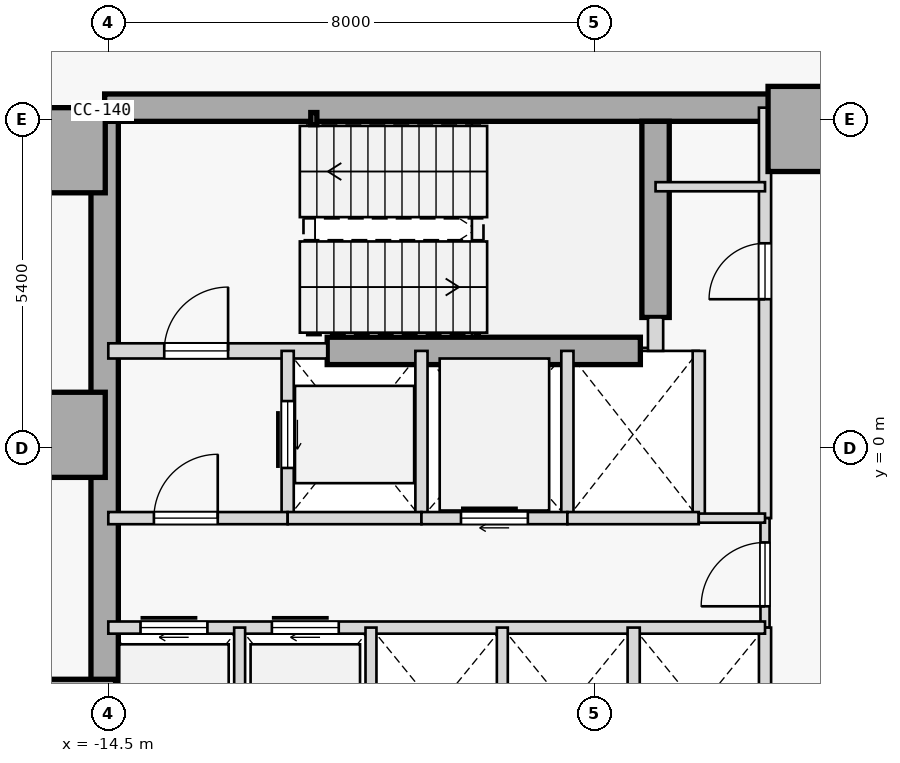
"""IFC4 building model, lengths in metres.
Left out: names, types, materials, properties, quantities, classifications, styles, units other than length and angle.
Written with IfcOpenShell. Run it as: python <this file> out.ifc"""

import sys

from ifc_helpers import new_model, si_unit, direction, frame, frame_2d, origin, origin_2d, place, context, subcontext, project, spatial, rectangle, hollow_rectangle, extrude, element, fill, save


model = new_model("IFC4")
c1 = context("Model", 3, precision=1e-05, world=origin(), true_north=direction((0.0, 1.0)))
c2 = subcontext(c1, "Body", "Model", "MODEL_VIEW")
j1 = project(units=[si_unit("LENGTHUNIT", "METRE"), si_unit("PLANEANGLEUNIT", "RADIAN")], contexts=[c1])
p1 = place(None, origin())
s1 = spatial("IfcSite", under=j1, at=p1, CompositionType="ELEMENT")
p2 = place(p1, origin())
s2 = spatial("IfcBuilding", under=s1, at=p2, CompositionType="ELEMENT")
p3 = place(p2, frame((0.0, 0.0, 56.0)))
s3 = spatial("IfcBuildingStorey", under=s2, at=p3, CompositionType="ELEMENT", Elevation=56.0)
for number, where, z_axis, x_axis in (
    (1, (-15.25, 4.9, 0.0), (0.0, 0.0, 1.0), (1.0, 0.0, 0.0)),
    (2, (-15.25, 0.22, 0.0), (0.0, 0.0, 1.0), (1.0, 0.0, 0.0)),
    (3, (-15.08, -4.5, 0.0), (0.0, 0.0, 1.0), (1.0, 0.0, 0.0)),
    (4, (-2.95, 5.25, 0.0), (0.0, 0.0, 1.0), (1.0, 0.0, 0.0)),
):
    element("IfcColumn", number, at=place(p3, frame(where, z_axis=z_axis, x_axis=x_axis)), inside=s3, PredefinedType="COLUMN", context=c2, shape_type="SweptSolid", body=[
        extrude(rectangle(XDim=1.4, YDim=1.4, at=origin_2d()), origin(), (0.0, 0.0, 1.0), 3.8),
    ])
p4 = place(p3, frame((-14.56, 5.6, 0.0), z_axis=(0.0, 0.0, 1.0), x_axis=(1.0, 0.0, 0.0)))
e5 = element("IfcWall", 5, at=p4, inside=s3, PredefinedType="SHEAR", context=c2, shape_type="SweptSolid", body=[
    extrude(rectangle(XDim=11.41, YDim=0.45, at=frame_2d((5.705, 0.0))), origin(), (0.0, 0.0, 1.0), 3.575),
])
p5 = place(p3, frame((-14.56, -5.375, 0.0), z_axis=(0.0, 0.0, 1.0), x_axis=(0.0, 1.0, 0.0)))
e6 = element("IfcWall", 6, at=p5, inside=s3, PredefinedType="SHEAR", context=c2, shape_type="SweptSolid", body=[
    extrude(rectangle(XDim=10.75, YDim=0.45, at=frame_2d((5.375, 0.0))), origin(), (0.0, 0.0, 1.0), 3.575),
])
p6 = place(p3, frame((-5.5, 2.15, 0.0), z_axis=(0.0, 0.0, 1.0), x_axis=(0.0, 1.0, 0.0)))
e7 = element("IfcWall", 7, at=p6, inside=s3, PredefinedType="SHEAR", context=c2, shape_type="SweptSolid", body=[
    extrude(rectangle(XDim=3.225, YDim=0.45, at=frame_2d((1.613, 0.0))), origin(), (0.0, 0.0, 1.0), 3.575),
])
p7 = place(p3, frame((-10.9, 1.6, 0.0), z_axis=(0.0, 0.0, 1.0), x_axis=(1.0, 0.0, 0.0)))
e8 = element("IfcWall", 8, at=p7, inside=s3, PredefinedType="SHEAR", context=c2, shape_type="SweptSolid", body=[
    extrude(rectangle(XDim=5.15, YDim=0.45, at=frame_2d((2.575, 0.0))), origin(), (0.0, 0.0, 1.0), 3.575),
])
p8 = place(p3, frame((-11.12, 5.42, 0.0), z_axis=(0.0, 0.0, 1.0), x_axis=(1.0, 0.0, 0.0)))
e9 = element("IfcColumn", 9, at=p8, inside=s3, PredefinedType="COLUMN", context=c2, shape_type="SweptSolid", body=[
    extrude(hollow_rectangle(XDim=0.1, YDim=0.2, WallThickness=0.008, at=origin_2d()), origin(), (0.0, 0.0, 1.0), 3.8),
])
p9 = place(p3, frame((-14.5, 1.6, 0.0), z_axis=(0.0, 0.0, 1.0), x_axis=(1.0, 0.0, 0.0)))
e10 = element("IfcWall", 10, at=p9, inside=s3, PredefinedType="STANDARD", context=c2, shape_type="SweptSolid", body=[
    extrude(rectangle(XDim=3.6, YDim=0.25, at=frame_2d((1.8, 0.0))), origin(), (0.0, 0.0, 1.0), 3.575),
])
p10 = place(p9, frame((0.92, 0.0, 0.0)))
e11 = element("IfcOpeningElement", 11, at=p10, cuts=e10, PredefinedType="OPENING", context=c2, shape_type="SweptSolid", body=[
    extrude(rectangle(XDim=1.05, YDim=2.15, at=frame_2d((0.525, 1.075))), frame((0.0, 0.135, 0.0), z_axis=(0.0, -1.0, 0.0), x_axis=(1.0, 0.0, 0.0)), (0.0, 0.0, 1.0), 0.27),
])
p11 = place(p3, frame((-5.5, 1.6, 0.0), z_axis=(0.0, 0.0, 1.0), x_axis=(0.0, 1.0, 0.0)))
e12 = element("IfcWall", 12, at=p11, inside=s3, PredefinedType="STANDARD", context=c2, shape_type="SweptSolid", body=[
    extrude(rectangle(XDim=0.55, YDim=0.25, at=frame_2d((0.275, 0.0))), origin(), (0.0, 0.0, 1.0), 3.575),
])
p12 = place(p3, frame((-3.7, -1.15, 0.0), z_axis=(0.0, 0.0, 1.0), x_axis=(0.0, 1.0, 0.0)))
e13 = element("IfcWall", 13, at=p12, inside=s3, PredefinedType="STANDARD", context=c2, shape_type="SweptSolid", body=[
    extrude(rectangle(XDim=6.75, YDim=0.2, at=frame_2d((3.375, 0.0))), origin(), (0.0, 0.0, 1.0), 3.575),
])
p13 = place(p12, frame((3.6, 0.0, 0.0)))
e14 = element("IfcOpeningElement", 14, at=p13, cuts=e13, PredefinedType="OPENING", context=c2, shape_type="SweptSolid", body=[
    extrude(rectangle(XDim=0.92, YDim=2.15, at=frame_2d((0.46, 1.075))), frame((0.0, 0.11, 0.0), z_axis=(0.0, -1.0, 0.0), x_axis=(1.0, 0.0, 0.0)), (0.0, 0.0, 1.0), 0.22),
])
p14 = place(p3, frame((-3.7, -2.95, 0.0), z_axis=(0.0, 0.0, 1.0), x_axis=(0.0, 1.0, 0.0)))
e15 = element("IfcWall", 15, at=p14, inside=s3, PredefinedType="PARTITIONING", context=c2, shape_type="SweptSolid", body=[
    extrude(rectangle(XDim=1.8, YDim=0.15, at=frame_2d((0.9, 0.0))), origin(), (0.0, 0.0, 1.0), 3.575),
])
p15 = place(p14, frame((0.35, 0.0, 0.0)))
e16 = element("IfcOpeningElement", 16, at=p15, cuts=e15, PredefinedType="OPENING", context=c2, shape_type="SweptSolid", body=[
    extrude(rectangle(XDim=1.05, YDim=2.18, at=frame_2d((0.525, 1.09))), frame((0.0, 0.085, 0.0), z_axis=(0.0, -1.0, 0.0), x_axis=(1.0, 0.0, 0.0)), (0.0, 0.0, 1.0), 0.17),
])
p16 = place(p3, frame((-3.7, -5.6, 0.0), z_axis=(0.0, 0.0, 1.0), x_axis=(0.0, 1.0, 0.0)))
e17 = element("IfcWall", 17, at=p16, inside=s3, PredefinedType="STANDARD", context=c2, shape_type="SweptSolid", body=[
    extrude(rectangle(XDim=2.65, YDim=0.2, at=frame_2d((1.325, 0.0))), origin(), (0.0, 0.0, 1.0), 3.575),
])
p17 = place(p3, frame((-11.55, -1.15, 0.0), z_axis=(0.0, 0.0, 1.0), x_axis=(0.0, 1.0, 0.0)))
e18 = element("IfcWall", 18, at=p17, inside=s3, PredefinedType="STANDARD", context=c2, shape_type="SweptSolid", body=[
    extrude(rectangle(XDim=2.75, YDim=0.2, at=frame_2d((1.375, 0.0))), origin(), (0.0, 0.0, 1.0), 3.575),
])
p18 = place(p17, frame((0.825, 0.0, 0.0)))
e19 = element("IfcOpeningElement", 19, at=p18, cuts=e18, PredefinedType="OPENING", context=c2, shape_type="SweptSolid", body=[
    extrude(rectangle(XDim=1.1, YDim=2.15, at=frame_2d((0.55, 1.075))), frame((0.0, 0.11, 0.0), z_axis=(0.0, -1.0, 0.0), x_axis=(1.0, 0.0, 0.0)), (0.0, 0.0, 1.0), 0.22),
])
p19 = place(p3, frame((-9.35, -1.15, 0.0), z_axis=(0.0, 0.0, 1.0), x_axis=(0.0, 1.0, 0.0)))
e20 = element("IfcWall", 20, at=p19, inside=s3, PredefinedType="STANDARD", context=c2, shape_type="SweptSolid", body=[
    extrude(rectangle(XDim=2.75, YDim=0.2, at=frame_2d((1.375, 0.0))), origin(), (0.0, 0.0, 1.0), 3.575),
])
p20 = place(p3, frame((-14.5, -1.15, 0.0), z_axis=(0.0, 0.0, 1.0), x_axis=(1.0, 0.0, 0.0)))
e21 = element("IfcWall", 21, at=p20, inside=s3, PredefinedType="STANDARD", context=c2, shape_type="SweptSolid", body=[
    extrude(rectangle(XDim=2.95, YDim=0.2, at=frame_2d((1.475, 0.0))), origin(), (0.0, 0.0, 1.0), 3.575),
])
p21 = place(p20, frame((0.75, 0.0, 0.0)))
e22 = element("IfcOpeningElement", 22, at=p21, cuts=e21, PredefinedType="OPENING", context=c2, shape_type="SweptSolid", body=[
    extrude(rectangle(XDim=1.05, YDim=2.18, at=frame_2d((0.525, 1.09))), frame((0.0, 0.11, 0.0), z_axis=(0.0, -1.0, 0.0), x_axis=(1.0, 0.0, 0.0)), (0.0, 0.0, 1.0), 0.22),
])
p22 = place(p3, frame((-11.55, -1.15, 0.0), z_axis=(0.0, 0.0, 1.0), x_axis=(1.0, 0.0, 0.0)))
e23 = element("IfcWall", 23, at=p22, inside=s3, PredefinedType="STANDARD", context=c2, shape_type="SweptSolid", body=[
    extrude(rectangle(XDim=2.2, YDim=0.2, at=frame_2d((1.1, 0.0))), origin(), (0.0, 0.0, 1.0), 3.575),
])
p23 = place(p3, frame((-6.95, -1.15, 0.0), z_axis=(0.0, 0.0, 1.0), x_axis=(0.0, 1.0, 0.0)))
e24 = element("IfcWall", 24, at=p23, inside=s3, PredefinedType="STANDARD", context=c2, shape_type="SweptSolid", body=[
    extrude(rectangle(XDim=2.75, YDim=0.2, at=frame_2d((1.375, 0.0))), origin(), (0.0, 0.0, 1.0), 3.575),
])
p24 = place(p3, frame((-9.35, -1.15, 0.0), z_axis=(0.0, 0.0, 1.0), x_axis=(1.0, 0.0, 0.0)))
e25 = element("IfcWall", 25, at=p24, inside=s3, PredefinedType="STANDARD", context=c2, shape_type="SweptSolid", body=[
    extrude(rectangle(XDim=2.4, YDim=0.2, at=frame_2d((1.2, 0.0))), origin(), (0.0, 0.0, 1.0), 3.575),
])
p25 = place(p24, frame((0.65, 0.0, 0.0)))
e26 = element("IfcOpeningElement", 26, at=p25, cuts=e25, PredefinedType="OPENING", context=c2, shape_type="SweptSolid", body=[
    extrude(rectangle(XDim=1.1, YDim=2.15, at=frame_2d((0.55, 1.075))), frame((0.0, 0.11, 0.0), z_axis=(0.0, -1.0, 0.0), x_axis=(1.0, 0.0, 0.0)), (0.0, 0.0, 1.0), 0.22),
])
p26 = place(p3, frame((-4.79, -1.15, 0.0), z_axis=(0.0, 0.0, 1.0), x_axis=(0.0, 1.0, 0.0)))
e27 = element("IfcWall", 27, at=p26, inside=s3, PredefinedType="STANDARD", context=c2, shape_type="SweptSolid", body=[
    extrude(rectangle(XDim=2.75, YDim=0.2, at=frame_2d((1.375, 0.0))), origin(), (0.0, 0.0, 1.0), 3.575),
])
p27 = place(p3, frame((-6.95, -1.15, 0.0), z_axis=(0.0, 0.0, 1.0), x_axis=(1.0, 0.0, 0.0)))
e28 = element("IfcWall", 28, at=p27, inside=s3, PredefinedType="STANDARD", context=c2, shape_type="SweptSolid", body=[
    extrude(rectangle(XDim=2.16, YDim=0.2, at=frame_2d((1.08, 0.0))), origin(), (0.0, 0.0, 1.0), 3.575),
])
p28 = place(p3, frame((-4.79, -1.15, 0.0), z_axis=(0.0, 0.0, 1.0), x_axis=(1.0, 0.0, 0.0)))
e29 = element("IfcWall", 29, at=p28, inside=s3, PredefinedType="PARTITIONING", context=c2, shape_type="SweptSolid", body=[
    extrude(rectangle(XDim=1.09, YDim=0.15, at=frame_2d((0.545, 0.0))), origin(), (0.0, 0.0, 1.0), 3.575),
])
p29 = place(p3, frame((-14.5, -2.95, 0.0), z_axis=(0.0, 0.0, 1.0), x_axis=(1.0, 0.0, 0.0)))
e30 = element("IfcWall", 30, at=p29, inside=s3, PredefinedType="STANDARD", context=c2, shape_type="SweptSolid", body=[
    extrude(rectangle(XDim=10.8, YDim=0.2, at=frame_2d((5.4, 0.0))), origin(), (0.0, 0.0, 1.0), 3.575),
])
p30 = place(p29, frame((0.53, 0.0, 0.0)))
e31 = element("IfcOpeningElement", 31, at=p30, cuts=e30, PredefinedType="OPENING", context=c2, shape_type="SweptSolid", body=[
    extrude(rectangle(XDim=1.1, YDim=2.15, at=frame_2d((0.55, 1.075))), frame((0.0, 0.11, 0.0), z_axis=(0.0, -1.0, 0.0), x_axis=(1.0, 0.0, 0.0)), (0.0, 0.0, 1.0), 0.22),
])
p31 = place(p29, frame((2.69, 0.0, 0.0)))
e32 = element("IfcOpeningElement", 32, at=p31, cuts=e30, PredefinedType="OPENING", context=c2, shape_type="SweptSolid", body=[
    extrude(rectangle(XDim=1.1, YDim=2.15, at=frame_2d((0.55, 1.075))), frame((0.0, 0.11, 0.0), z_axis=(0.0, -1.0, 0.0), x_axis=(1.0, 0.0, 0.0)), (0.0, 0.0, 1.0), 0.22),
])
p32 = place(p3, frame((-5.86, -5.6, 0.0), z_axis=(0.0, 0.0, 1.0), x_axis=(0.0, 1.0, 0.0)))
e33 = element("IfcWall", 33, at=p32, inside=s3, PredefinedType="STANDARD", context=c2, shape_type="SweptSolid", body=[
    extrude(rectangle(XDim=2.65, YDim=0.2, at=frame_2d((1.325, 0.0))), origin(), (0.0, 0.0, 1.0), 3.575),
])
for number, where, z_axis, x_axis in (
    (34, (-12.34, -5.6, 0.0), (0.0, 0.0, 1.0), (0.0, 1.0, 0.0)),
    (35, (-10.18, -5.6, 0.0), (0.0, 0.0, 1.0), (0.0, 1.0, 0.0)),
    (36, (-8.02, -5.6, 0.0), (0.0, 0.0, 1.0), (0.0, 1.0, 0.0)),
):
    element("IfcWall", number, at=place(p3, frame(where, z_axis=z_axis, x_axis=x_axis)), inside=s3, PredefinedType="STANDARD", context=c2, shape_type="SweptSolid", body=[
        extrude(rectangle(XDim=2.65, YDim=0.18, at=frame_2d((1.325, 0.0))), origin(), (0.0, 0.0, 1.0), 3.575),
    ])
p33 = place(p3, frame((-5.5, 4.3, 0.0), z_axis=(0.0, 0.0, 1.0), x_axis=(1.0, 0.0, 0.0)))
e37 = element("IfcWall", 37, at=p33, inside=s3, PredefinedType="PARTITIONING", context=c2, shape_type="SweptSolid", body=[
    extrude(rectangle(XDim=1.8, YDim=0.15, at=frame_2d((0.9, 0.0))), origin(), (0.0, 0.0, 1.0), 3.575),
])
p34 = place(p10, origin())
e38 = element("IfcDoor", 38, at=p34, inside=s3, OperationType="SINGLE_SWING_RIGHT", PredefinedType="DOOR", context=c2, shape_type="SweptSolid", body=[
    extrude(rectangle(XDim=1.05, YDim=2.15, at=frame_2d((0.525, 1.075))), frame((0.0, 0.025, 0.0), z_axis=(0.0, -1.0, 0.0), x_axis=(1.0, 0.0, 0.0)), (0.0, 0.0, 1.0), 0.05),
])
fill(e11, e38)
p35 = place(p21, origin())
e39 = element("IfcDoor", 39, at=p35, inside=s3, OperationType="SINGLE_SWING_RIGHT", PredefinedType="DOOR", context=c2, shape_type="SweptSolid", body=[
    extrude(rectangle(XDim=1.05, YDim=2.18, at=frame_2d((0.525, 1.09))), frame((0.0, 0.025, 0.0), z_axis=(0.0, -1.0, 0.0), x_axis=(1.0, 0.0, 0.0)), (0.0, 0.0, 1.0), 0.05),
])
fill(e22, e39)
p36 = place(p15, origin())
e40 = element("IfcDoor", 40, at=p36, inside=s3, OperationType="SINGLE_SWING_LEFT", PredefinedType="DOOR", context=c2, shape_type="SweptSolid", body=[
    extrude(rectangle(XDim=1.05, YDim=2.18, at=frame_2d((0.525, 1.09))), frame((0.0, 0.025, 0.0), z_axis=(0.0, -1.0, 0.0), x_axis=(1.0, 0.0, 0.0)), (0.0, 0.0, 1.0), 0.05),
])
fill(e16, e40)
p37 = place(p18, origin())
e41 = element("IfcDoor", 41, at=p37, inside=s3, OperationType="SLIDING_TO_RIGHT", PredefinedType="DOOR", context=c2, shape_type="SweptSolid", body=[
    extrude(rectangle(XDim=1.1, YDim=2.15, at=frame_2d((0.55, 1.075))), frame((0.0, 0.025, 0.0), z_axis=(0.0, -1.0, 0.0), x_axis=(1.0, 0.0, 0.0)), (0.0, 0.0, 1.0), 0.05),
])
fill(e19, e41)
p38 = place(p25, origin())
e42 = element("IfcDoor", 42, at=p38, inside=s3, OperationType="SLIDING_TO_RIGHT", PredefinedType="DOOR", context=c2, shape_type="SweptSolid", body=[
    extrude(rectangle(XDim=1.1, YDim=2.15, at=frame_2d((0.55, 1.075))), frame((0.0, 0.025, 0.0), z_axis=(0.0, -1.0, 0.0), x_axis=(1.0, 0.0, 0.0)), (0.0, 0.0, 1.0), 0.05),
])
fill(e26, e42)
p39 = place(p30, origin())
e43 = element("IfcDoor", 43, at=p39, inside=s3, OperationType="SLIDING_TO_RIGHT", PredefinedType="DOOR", context=c2, shape_type="SweptSolid", body=[
    extrude(rectangle(XDim=1.1, YDim=2.15, at=frame_2d((0.55, 1.075))), frame((0.0, 0.025, 0.0), z_axis=(0.0, -1.0, 0.0), x_axis=(1.0, 0.0, 0.0)), (0.0, 0.0, 1.0), 0.05),
])
fill(e31, e43)
p40 = place(p31, origin())
e44 = element("IfcDoor", 44, at=p40, inside=s3, OperationType="SLIDING_TO_RIGHT", PredefinedType="DOOR", context=c2, shape_type="SweptSolid", body=[
    extrude(rectangle(XDim=1.1, YDim=2.15, at=frame_2d((0.55, 1.075))), frame((0.0, 0.025, 0.0), z_axis=(0.0, -1.0, 0.0), x_axis=(1.0, 0.0, 0.0)), (0.0, 0.0, 1.0), 0.05),
])
fill(e32, e44)
p41 = place(p13, origin())
e45 = element("IfcDoor", 45, at=p41, inside=s3, OperationType="SINGLE_SWING_LEFT", PredefinedType="DOOR", context=c2, shape_type="SweptSolid", body=[
    extrude(rectangle(XDim=0.92, YDim=2.15, at=frame_2d((0.46, 1.075))), frame((0.0, 0.025, 0.0), z_axis=(0.0, -1.0, 0.0), x_axis=(1.0, 0.0, 0.0)), (0.0, 0.0, 1.0), 0.05),
])
fill(e14, e45)
save(model, sys.argv[1])
